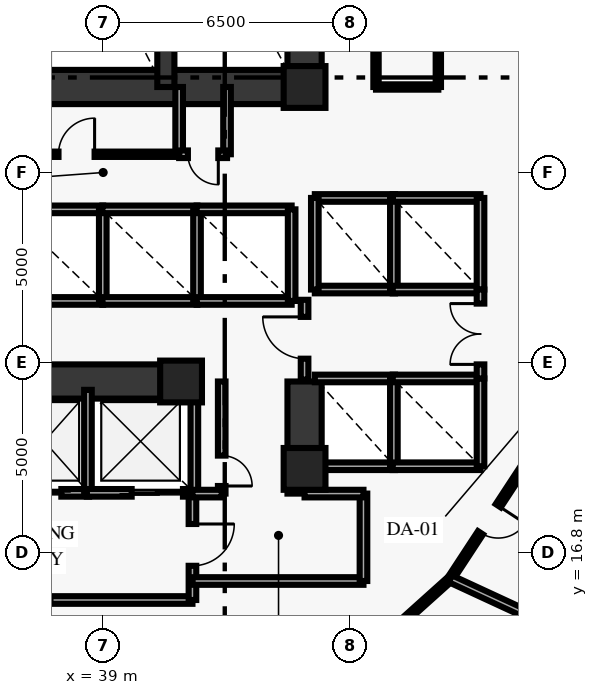
"""IFC4 building model, lengths in metres.
Left out: names, types, materials, properties, quantities, classifications, styles, units other than length and angle.
Written with IfcOpenShell. Run it as: python <this file> out.ifc"""

import sys

from ifc_helpers import new_model, si_unit, direction, frame, frame_2d, origin, origin_2d, place, context, subcontext, project, spatial, rectangle, extrude, element, fill, save


model = new_model("IFC4")
c1 = context("Model", 3, precision=1e-05, world=origin(), true_north=direction((0.0, 1.0)))
c2 = subcontext(c1, "Body", "Model", "MODEL_VIEW")
j1 = project(units=[si_unit("LENGTHUNIT", "METRE"), si_unit("PLANEANGLEUNIT", "RADIAN")], contexts=[c1])
p1 = place(None, origin())
s1 = spatial("IfcSite", under=j1, at=p1, CompositionType="ELEMENT")
p2 = place(p1, origin())
s2 = spatial("IfcBuilding", under=s1, at=p2, CompositionType="ELEMENT")
p3 = place(p2, frame((0.0, 0.0, 16.0)))
s3 = spatial("IfcBuildingStorey", under=s2, at=p3, CompositionType="ELEMENT", Elevation=16.0)
for number, where, z_axis, x_axis in (
    (1, (41.05, 21.3, 0.0), (0.0, 0.0, 1.0), (1.0, 0.0, 0.0)),
    (2, (44.3, 19.0, 0.0), (0.0, 0.0, 1.0), (1.0, 0.0, 0.0)),
    (3, (44.3, 29.05, 0.0), (0.0, 0.0, 1.0), (1.0, 0.0, 0.0)),
):
    element("IfcColumn", number, at=place(p3, frame(where, z_axis=z_axis, x_axis=x_axis)), inside=s3, PredefinedType="PILASTER", context=c2, shape_type="SweptSolid", body=[
        extrude(rectangle(XDim=1.1, YDim=1.1, at=origin_2d()), origin(), (0.0, 0.0, 1.0), 4.74),
    ])
p4 = place(p3, frame((44.3, 29.05, 0.0), z_axis=(0.0, 0.0, 1.0), x_axis=(0.0, 1.0, 0.0)))
e4 = element("IfcWall", 4, at=p4, inside=s3, PredefinedType="SHEAR", context=c2, shape_type="SweptSolid", body=[
    extrude(rectangle(XDim=8.35, YDim=0.9, at=frame_2d((4.175, 0.0))), origin(), (0.0, 0.0, 1.0), 4.74),
])
p5 = place(p3, frame((44.3, 18.35, 0.0), z_axis=(0.0, 0.0, 1.0), x_axis=(0.0, 1.0, 0.0)))
e5 = element("IfcWall", 5, at=p5, inside=s3, PredefinedType="SHEAR", context=c2, shape_type="SweptSolid", body=[
    extrude(rectangle(XDim=2.95, YDim=0.9, at=frame_2d((1.475, 0.0))), origin(), (0.0, 0.0, 1.0), 4.74),
])
p6 = place(p3, frame((33.7, 29.05, 0.0), z_axis=(0.0, 0.0, 1.0), x_axis=(1.0, 0.0, 0.0)))
e6 = element("IfcWall", 6, at=p6, inside=s3, PredefinedType="SHEAR", context=c2, shape_type="SweptSolid", body=[
    extrude(rectangle(XDim=10.6, YDim=0.9, at=frame_2d((5.3, 0.0))), origin(), (0.0, 0.0, 1.0), 4.74),
])
p7 = place(p3, frame((33.7, 21.3, 0.0), z_axis=(0.0, 0.0, 1.0), x_axis=(1.0, 0.0, 0.0)))
e7 = element("IfcWall", 7, at=p7, inside=s3, PredefinedType="SHEAR", context=c2, shape_type="SweptSolid", body=[
    extrude(rectangle(XDim=7.55, YDim=0.9, at=frame_2d((3.775, 0.0))), origin(), (0.0, 0.0, 1.0), 4.74),
])
p8 = place(p3, frame((40.65, 29.05, 0.0), z_axis=(0.0, 0.0, 1.0), x_axis=(0.0, 1.0, 0.0)))
e8 = element("IfcWall", 8, at=p8, inside=s3, PredefinedType="SHEAR", context=c2, shape_type="SweptSolid", body=[
    extrude(rectangle(XDim=8.35, YDim=0.45, at=frame_2d((4.175, 0.0))), origin(), (0.0, 0.0, 1.0), 4.74),
])
for number, where, z_axis, x_axis in (
    (9, (41.0, 27.28, 0.0), (0.0, 0.0, 1.0), (0.0, 1.0, 0.0)),
    (10, (42.26, 27.28, 0.0), (0.0, 0.0, 1.0), (0.0, 1.0, 0.0)),
):
    element("IfcWall", number, at=place(p3, frame(where, z_axis=z_axis, x_axis=x_axis)), inside=s3, PredefinedType="SOLIDWALL", context=c2, shape_type="SweptSolid", body=[
        extrude(rectangle(XDim=1.77, YDim=0.2, at=frame_2d((0.885, 0.0))), origin(), (0.0, 0.0, 1.0), 4.74),
    ])
p9 = place(p3, frame((41.0, 27.28, 0.0), z_axis=(0.0, 0.0, 1.0), x_axis=(1.0, 0.0, 0.0)))
e11 = element("IfcWall", 11, at=p9, inside=s3, PredefinedType="SOLIDWALL", context=c2, shape_type="SweptSolid", body=[
    extrude(rectangle(XDim=1.26, YDim=0.2, at=frame_2d((0.63, 0.0))), origin(), (0.0, 0.0, 1.0), 4.74),
])
p10 = place(p9, frame((0.23, 0.0, 0.0)))
e12 = element("IfcOpeningElement", 12, at=p10, cuts=e11, PredefinedType="OPENING", context=c2, shape_type="SweptSolid", body=[
    extrude(rectangle(XDim=0.8, YDim=2.05, at=frame_2d((0.4, 1.025))), frame((0.0, 0.11, 0.0), z_axis=(0.0, -1.0, 0.0), x_axis=(1.0, 0.0, 0.0)), (0.0, 0.0, 1.0), 0.22),
])
for number, where, z_axis, x_axis in (
    (13, (44.57, 23.72, 0.0), (0.0, 0.0, 1.0), (1.0, 0.0, 0.0)),
    (14, (44.57, 26.13, 0.0), (0.0, 0.0, 1.0), (1.0, 0.0, 0.0)),
):
    element("IfcWall", number, at=place(p3, frame(where, z_axis=z_axis, x_axis=x_axis)), inside=s3, PredefinedType="SOLIDWALL", context=c2, shape_type="SweptSolid", body=[
        extrude(rectangle(XDim=2.11, YDim=0.2, at=frame_2d((1.055, 0.0))), origin(), (0.0, 0.0, 1.0), 4.74),
    ])
for number, where, z_axis, x_axis in (
    (15, (44.57, 23.72, 0.0), (0.0, 0.0, 1.0), (0.0, 1.0, 0.0)),
    (16, (46.65, 23.72, 0.0), (0.0, 0.0, 1.0), (0.0, 1.0, 0.0)),
):
    element("IfcWall", number, at=place(p3, frame(where, z_axis=z_axis, x_axis=x_axis)), inside=s3, PredefinedType="SOLIDWALL", context=c2, shape_type="SweptSolid", body=[
        extrude(rectangle(XDim=2.41, YDim=0.2, at=frame_2d((1.205, 0.0))), origin(), (0.0, 0.0, 1.0), 4.74),
    ])
for number, where, z_axis, x_axis in (
    (17, (46.62, 23.72, 0.0), (0.0, 0.0, 1.0), (1.0, 0.0, 0.0)),
    (18, (46.62, 26.13, 0.0), (0.0, 0.0, 1.0), (1.0, 0.0, 0.0)),
):
    element("IfcWall", number, at=place(p3, frame(where, z_axis=z_axis, x_axis=x_axis)), inside=s3, PredefinedType="SOLIDWALL", context=c2, shape_type="SweptSolid", body=[
        extrude(rectangle(XDim=2.31, YDim=0.2, at=frame_2d((1.155, 0.0))), origin(), (0.0, 0.0, 1.0), 4.74),
    ])
p11 = place(p3, frame((48.93, 23.72, 0.0), z_axis=(0.0, 0.0, 1.0), x_axis=(0.0, 1.0, 0.0)))
e19 = element("IfcWall", 19, at=p11, inside=s3, PredefinedType="SOLIDWALL", context=c2, shape_type="SweptSolid", body=[
    extrude(rectangle(XDim=2.41, YDim=0.2, at=frame_2d((1.205, 0.0))), origin(), (0.0, 0.0, 1.0), 4.74),
])
for number, where, z_axis, x_axis in (
    (20, (44.57, 19.07, 0.0), (0.0, 0.0, 1.0), (1.0, 0.0, 0.0)),
    (21, (44.57, 21.38, 0.0), (0.0, 0.0, 1.0), (1.0, 0.0, 0.0)),
):
    element("IfcWall", number, at=place(p3, frame(where, z_axis=z_axis, x_axis=x_axis)), inside=s3, PredefinedType="SOLIDWALL", context=c2, shape_type="SweptSolid", body=[
        extrude(rectangle(XDim=2.11, YDim=0.2, at=frame_2d((1.055, 0.0))), origin(), (0.0, 0.0, 1.0), 4.74),
    ])
for number, where, z_axis, x_axis in (
    (22, (46.65, 19.07, 0.0), (0.0, 0.0, 1.0), (0.0, 1.0, 0.0)),
    (23, (46.62, 19.07, 0.0), (0.0, 0.0, 1.0), (1.0, 0.0, 0.0)),
    (24, (46.62, 21.38, 0.0), (0.0, 0.0, 1.0), (1.0, 0.0, 0.0)),
    (25, (48.93, 19.07, 0.0), (0.0, 0.0, 1.0), (0.0, 1.0, 0.0)),
):
    element("IfcWall", number, at=place(p3, frame(where, z_axis=z_axis, x_axis=x_axis)), inside=s3, PredefinedType="SOLIDWALL", context=c2, shape_type="SweptSolid", body=[
        extrude(rectangle(XDim=2.31, YDim=0.2, at=frame_2d((1.155, 0.0))), origin(), (0.0, 0.0, 1.0), 4.74),
    ])
for number, where, z_axis, x_axis in (
    (26, (36.5, 23.42, 0.0), (0.0, 0.0, 1.0), (1.0, 0.0, 0.0)),
    (27, (36.5, 25.83, 0.0), (0.0, 0.0, 1.0), (1.0, 0.0, 0.0)),
):
    element("IfcWall", number, at=place(p3, frame(where, z_axis=z_axis, x_axis=x_axis)), inside=s3, PredefinedType="SOLIDWALL", context=c2, shape_type="SweptSolid", body=[
        extrude(rectangle(XDim=2.5, YDim=0.2, at=frame_2d((1.25, 0.0))), origin(), (0.0, 0.0, 1.0), 4.74),
    ])
p12 = place(p3, frame((38.99, 23.42, 0.0), z_axis=(0.0, 0.0, 1.0), x_axis=(0.0, 1.0, 0.0)))
e28 = element("IfcWall", 28, at=p12, inside=s3, PredefinedType="SOLIDWALL", context=c2, shape_type="SweptSolid", body=[
    extrude(rectangle(XDim=2.41, YDim=0.2, at=frame_2d((1.205, 0.0))), origin(), (0.0, 0.0, 1.0), 4.74),
])
for number, where, z_axis, x_axis in (
    (29, (38.98, 23.42, 0.0), (0.0, 0.0, 1.0), (1.0, 0.0, 0.0)),
    (30, (38.98, 25.83, 0.0), (0.0, 0.0, 1.0), (1.0, 0.0, 0.0)),
):
    element("IfcWall", number, at=place(p3, frame(where, z_axis=z_axis, x_axis=x_axis)), inside=s3, PredefinedType="SOLIDWALL", context=c2, shape_type="SweptSolid", body=[
        extrude(rectangle(XDim=2.5, YDim=0.2, at=frame_2d((1.25, 0.0))), origin(), (0.0, 0.0, 1.0), 4.74),
    ])
p13 = place(p3, frame((41.47, 23.42, 0.0), z_axis=(0.0, 0.0, 1.0), x_axis=(0.0, 1.0, 0.0)))
e31 = element("IfcWall", 31, at=p13, inside=s3, PredefinedType="SOLIDWALL", context=c2, shape_type="SweptSolid", body=[
    extrude(rectangle(XDim=2.41, YDim=0.2, at=frame_2d((1.205, 0.0))), origin(), (0.0, 0.0, 1.0), 4.74),
])
for number, where, z_axis, x_axis in (
    (32, (41.46, 23.42, 0.0), (0.0, 0.0, 1.0), (1.0, 0.0, 0.0)),
    (33, (41.46, 25.83, 0.0), (0.0, 0.0, 1.0), (1.0, 0.0, 0.0)),
):
    element("IfcWall", number, at=place(p3, frame(where, z_axis=z_axis, x_axis=x_axis)), inside=s3, PredefinedType="SOLIDWALL", context=c2, shape_type="SweptSolid", body=[
        extrude(rectangle(XDim=2.5, YDim=0.2, at=frame_2d((1.25, 0.0))), origin(), (0.0, 0.0, 1.0), 4.74),
    ])
p14 = place(p3, frame((43.96, 23.42, 0.0), z_axis=(0.0, 0.0, 1.0), x_axis=(0.0, 1.0, 0.0)))
e34 = element("IfcWall", 34, at=p14, inside=s3, PredefinedType="SOLIDWALL", context=c2, shape_type="SweptSolid", body=[
    extrude(rectangle(XDim=2.41, YDim=0.2, at=frame_2d((1.205, 0.0))), origin(), (0.0, 0.0, 1.0), 4.74),
])
p15 = place(p3, frame((36.27, 18.37, 0.0), z_axis=(0.0, 0.0, 1.0), x_axis=(1.0, 0.0, 0.0)))
e35 = element("IfcWall", 35, at=p15, inside=s3, PredefinedType="SOLIDWALL", context=c2, shape_type="SweptSolid", body=[
    extrude(rectangle(XDim=2.36, YDim=0.2, at=frame_2d((1.18, 0.0))), origin(), (0.0, 0.0, 1.0), 4.74),
])
p16 = place(p15, frame((0.38, 0.0, 0.0)))
e36 = element("IfcOpeningElement", 36, at=p16, cuts=e35, PredefinedType="OPENING", context=c2, shape_type="SweptSolid", body=[
    extrude(rectangle(XDim=1.25, YDim=2.2, at=frame_2d((0.625, 1.1))), frame((0.0, 0.11, 0.0), z_axis=(0.0, -1.0, 0.0), x_axis=(1.0, 0.0, 0.0)), (0.0, 0.0, 1.0), 0.22),
])
p17 = place(p3, frame((38.6, 18.37, 0.0), z_axis=(0.0, 0.0, 1.0), x_axis=(0.0, 1.0, 0.0)))
e37 = element("IfcWall", 37, at=p17, inside=s3, PredefinedType="SOLIDWALL", context=c2, shape_type="SweptSolid", body=[
    extrude(rectangle(XDim=2.71, YDim=0.2, at=frame_2d((1.355, 0.0))), origin(), (0.0, 0.0, 1.0), 4.74),
])
p18 = place(p3, frame((38.57, 18.37, 0.0), z_axis=(0.0, 0.0, 1.0), x_axis=(1.0, 0.0, 0.0)))
e38 = element("IfcWall", 38, at=p18, inside=s3, PredefinedType="SOLIDWALL", context=c2, shape_type="SweptSolid", body=[
    extrude(rectangle(XDim=2.83, YDim=0.2, at=frame_2d((1.415, 0.0))), origin(), (0.0, 0.0, 1.0), 4.74),
])
p19 = place(p18, frame((1.18, 0.0, 0.0)))
e39 = element("IfcOpeningElement", 39, at=p19, cuts=e38, PredefinedType="OPENING", context=c2, shape_type="SweptSolid", body=[
    extrude(rectangle(XDim=1.35, YDim=2.18, at=frame_2d((0.675, 1.09))), frame((0.0, 0.11, 0.0), z_axis=(0.0, -1.0, 0.0), x_axis=(1.0, 0.0, 0.0)), (0.0, 0.0, 1.0), 0.22),
])
p20 = place(p3, frame((41.4, 18.37, 0.0), z_axis=(0.0, 0.0, 1.0), x_axis=(0.0, 1.0, 0.0)))
e40 = element("IfcWall", 40, at=p20, inside=s3, PredefinedType="SOLIDWALL", context=c2, shape_type="SweptSolid", body=[
    extrude(rectangle(XDim=2.71, YDim=0.2, at=frame_2d((1.355, 0.0))), origin(), (0.0, 0.0, 1.0), 4.74),
])
p21 = place(p3, frame((48.93, 21.38, 0.0), z_axis=(0.0, 0.0, 1.0), x_axis=(0.0, 1.0, 0.0)))
e41 = element("IfcWall", 41, at=p21, inside=s3, PredefinedType="SOLIDWALL", context=c2, shape_type="SweptSolid", body=[
    extrude(rectangle(XDim=2.34, YDim=0.2, at=frame_2d((1.17, 0.0))), origin(), (0.0, 0.0, 1.0), 4.74),
])
p22 = place(p21, frame((0.37, 0.0, 0.0)))
e42 = element("IfcOpeningElement", 42, at=p22, cuts=e41, PredefinedType="OPENING", context=c2, shape_type="SweptSolid", body=[
    extrude(rectangle(XDim=1.6, YDim=2.2, at=frame_2d((0.8, 1.1))), frame((0.0, 0.11, 0.0), z_axis=(0.0, -1.0, 0.0), x_axis=(1.0, 0.0, 0.0)), (0.0, 0.0, 1.0), 0.22),
])
p23 = place(p3, frame((44.3, 21.35, 0.0), z_axis=(0.0, 0.0, 1.0), x_axis=(0.0, 1.0, 0.0)))
e43 = element("IfcWall", 43, at=p23, inside=s3, PredefinedType="SOLIDWALL", context=c2, shape_type="SweptSolid", body=[
    extrude(rectangle(XDim=2.1, YDim=0.2, at=frame_2d((1.05, 0.0))), origin(), (0.0, 0.0, 1.0), 3.96),
])
p24 = place(p23, frame((0.55, 0.0, 0.0)))
e44 = element("IfcOpeningElement", 44, at=p24, cuts=e43, PredefinedType="OPENING", context=c2, shape_type="SweptSolid", body=[
    extrude(rectangle(XDim=1.1, YDim=2.15, at=frame_2d((0.55, 1.075))), frame((0.0, 0.11, 0.0), z_axis=(0.0, -1.0, 0.0), x_axis=(1.0, 0.0, 0.0)), (0.0, 0.0, 1.0), 0.22),
])
p25 = place(p3, frame((33.8, 15.55, 0.0), z_axis=(0.0, 0.0, 1.0), x_axis=(1.0, 0.0, 0.0)))
e45 = element("IfcWall", 45, at=p25, inside=s3, PredefinedType="SOLIDWALL", context=c2, shape_type="SweptSolid", body=[
    extrude(rectangle(XDim=7.55, YDim=0.2, at=frame_2d((3.775, 0.0))), origin(), (0.0, 0.0, 1.0), 4.74),
])
p26 = place(p3, frame((41.35, 15.55, 0.0), z_axis=(0.0, 0.0, 1.0), x_axis=(0.0, 1.0, 0.0)))
e46 = element("IfcWall", 46, at=p26, inside=s3, PredefinedType="SOLIDWALL", context=c2, shape_type="SweptSolid", body=[
    extrude(rectangle(XDim=2.8, YDim=0.2, at=frame_2d((1.4, 0.0))), origin(), (0.0, 0.0, 1.0), 4.74),
])
p27 = place(p26, frame((0.9, 0.0, 0.0)))
e47 = element("IfcOpeningElement", 47, at=p27, cuts=e46, PredefinedType="OPENING", context=c2, shape_type="SweptSolid", body=[
    extrude(rectangle(XDim=1.1, YDim=2.15, at=frame_2d((0.55, 1.075))), frame((0.0, 0.11, 0.0), z_axis=(0.0, -1.0, 0.0), x_axis=(1.0, 0.0, 0.0)), (0.0, 0.0, 1.0), 0.22),
])
p28 = place(p3, frame((41.35, 16.05, 0.0), z_axis=(0.0, 0.0, 1.0), x_axis=(1.0, 0.0, 0.0)))
e48 = element("IfcWall", 48, at=p28, inside=s3, PredefinedType="SOLIDWALL", context=c2, shape_type="SweptSolid", body=[
    extrude(rectangle(XDim=4.5, YDim=0.2, at=frame_2d((2.25, 0.0))), origin(), (0.0, 0.0, 1.0), 4.74),
])
p29 = place(p3, frame((45.85, 16.05, 0.0), z_axis=(0.0, 0.0, 1.0), x_axis=(0.0, 1.0, 0.0)))
e49 = element("IfcWall", 49, at=p29, inside=s3, PredefinedType="SOLIDWALL", context=c2, shape_type="SweptSolid", body=[
    extrude(rectangle(XDim=2.3, YDim=0.2, at=frame_2d((1.15, 0.0))), origin(), (0.0, 0.0, 1.0), 4.74),
])
p30 = place(p3, frame((44.3, 18.35, 0.0), z_axis=(0.0, 0.0, 1.0), x_axis=(1.0, 0.0, 0.0)))
e50 = element("IfcWall", 50, at=p30, inside=s3, PredefinedType="SOLIDWALL", context=c2, shape_type="SweptSolid", body=[
    extrude(rectangle(XDim=1.55, YDim=0.2, at=frame_2d((0.775, 0.0))), origin(), (0.0, 0.0, 1.0), 4.74),
])
p31 = place(p3, frame((42.12, 18.35, 0.0), z_axis=(0.0, 0.0, 1.0), x_axis=(0.0, 1.0, 0.0)))
e51 = element("IfcWall", 51, at=p31, inside=s3, PredefinedType="SOLIDWALL", context=c2, shape_type="SweptSolid", body=[
    extrude(rectangle(XDim=2.95, YDim=0.2, at=frame_2d((1.475, 0.0))), origin(), (0.0, 0.0, 1.0), 4.74),
])
p32 = place(p31, frame((0.2, 0.0, 0.0)))
e52 = element("IfcOpeningElement", 52, at=p32, cuts=e51, PredefinedType="OPENING", context=c2, shape_type="SweptSolid", body=[
    extrude(rectangle(XDim=0.8, YDim=2.05, at=frame_2d((0.4, 1.025))), frame((0.0, 0.11, 0.0), z_axis=(0.0, -1.0, 0.0), x_axis=(1.0, 0.0, 0.0)), (0.0, 0.0, 1.0), 0.22),
])
p33 = place(p3, frame((41.35, 18.35, 0.0), z_axis=(0.0, 0.0, 1.0), x_axis=(1.0, 0.0, 0.0)))
e53 = element("IfcWall", 53, at=p33, inside=s3, PredefinedType="SOLIDWALL", context=c2, shape_type="SweptSolid", body=[
    extrude(rectangle(XDim=0.77, YDim=0.2, at=frame_2d((0.385, 0.0))), origin(), (0.0, 0.0, 1.0), 4.74),
])
p34 = place(p3, frame((35.6, 27.28, 0.0), z_axis=(0.0, 0.0, 1.0), x_axis=(1.0, 0.0, 0.0)))
e54 = element("IfcWall", 54, at=p34, inside=s3, PredefinedType="PARTITIONING", context=c2, shape_type="SweptSolid", body=[
    extrude(rectangle(XDim=5.4, YDim=0.14, at=frame_2d((2.7, 0.0))), origin(), (0.0, 0.0, 1.0), 4.74),
])
p35 = place(p34, frame((2.225, 0.0, 0.0)))
e55 = element("IfcOpeningElement", 55, at=p35, cuts=e54, PredefinedType="OPENING", context=c2, shape_type="SweptSolid", body=[
    extrude(rectangle(XDim=0.95, YDim=2.1, at=frame_2d((0.475, 1.05))), frame((0.0, 0.08, 0.0), z_axis=(0.0, -1.0, 0.0), x_axis=(1.0, 0.0, 0.0)), (0.0, 0.0, 1.0), 0.16),
])
p36 = place(p3, frame((46.18, 34.05, 0.0), z_axis=(0.0, 0.0, 1.0), x_axis=(0.0, -1.0, 0.0)))
e56 = element("IfcWall", 56, at=p36, inside=s3, PredefinedType="PARTITIONING", context=c2, shape_type="SweptSolid", body=[
    extrude(rectangle(XDim=5.0, YDim=0.14, at=frame_2d((2.5, 0.0))), origin(), (0.0, 0.0, 1.0), 4.74),
])
p37 = place(p36, frame((2.1, 0.0, 0.0)))
e57 = element("IfcOpeningElement", 57, at=p37, cuts=e56, PredefinedType="OPENING", context=c2, shape_type="SweptSolid", body=[
    extrude(rectangle(XDim=0.8, YDim=2.05, at=frame_2d((0.4, 1.025))), frame((0.0, 0.08, 0.0), z_axis=(0.0, -1.0, 0.0), x_axis=(1.0, 0.0, 0.0)), (0.0, 0.0, 1.0), 0.16),
])
p38 = place(p3, frame((46.18, 29.05, 0.0), z_axis=(0.0, 0.0, 1.0), x_axis=(1.0, 0.0, 0.0)))
e58 = element("IfcWall", 58, at=p38, inside=s3, PredefinedType="PARTITIONING", context=c2, shape_type="SweptSolid", body=[
    extrude(rectangle(XDim=1.64, YDim=0.14, at=frame_2d((0.82, 0.0))), origin(), (0.0, 0.0, 1.0), 2.74),
])
p39 = place(p3, frame((47.82, 29.05, 0.0), z_axis=(0.0, 0.0, 1.0), x_axis=(0.0, 1.0, 0.0)))
e59 = element("IfcWall", 59, at=p39, inside=s3, PredefinedType="PARTITIONING", context=c2, shape_type="SweptSolid", body=[
    extrude(rectangle(XDim=5.0, YDim=0.14, at=frame_2d((2.5, 0.0))), origin(), (0.0, 0.0, 1.0), 4.74),
])
p40 = place(p3, frame((45.46, 13.706, 0.0), z_axis=(0.0, 0.0, 1.0), x_axis=(0.744066617248, 0.668105432621, 0.0)))
e60 = element("IfcWall", 60, at=p40, inside=s3, PredefinedType="PARTITIONING", context=c2, shape_type="SweptSolid", body=[
    extrude(rectangle(XDim=3.596, YDim=0.16, at=frame_2d((1.798, 0.0))), origin(), (0.0, 0.0, 1.0), 4.74),
])
p41 = place(p3, frame((50.189, 19.24, 0.0), z_axis=(0.0, 0.0, 1.0), x_axis=(-0.548318837904, -0.836269365694, 0.0)))
e61 = element("IfcWall", 61, at=p41, inside=s3, PredefinedType="PARTITIONING", context=c2, shape_type="SweptSolid", body=[
    extrude(rectangle(XDim=3.744, YDim=0.16, at=frame_2d((1.872, 0.0))), origin(), (0.0, 0.0, 1.0), 4.74),
])
p42 = place(p41, frame((1.447, 0.0, 0.0)))
e62 = element("IfcOpeningElement", 62, at=p42, cuts=e61, PredefinedType="OPENING", context=c2, shape_type="SweptSolid", body=[
    extrude(rectangle(XDim=0.85, YDim=2.1, at=frame_2d((0.425, 1.05))), frame((0.0, 0.09, 0.0), z_axis=(0.0, -1.0, 0.0), x_axis=(1.0, 0.0, 0.0)), (0.0, 0.0, 1.0), 0.18),
])
p43 = place(p3, frame((48.136, 16.109, 0.0), z_axis=(0.0, 0.0, 1.0), x_axis=(0.907508335547, -0.420034071133, 0.0)))
e63 = element("IfcWall", 63, at=p43, inside=s3, PredefinedType="PARTITIONING", context=c2, shape_type="SweptSolid", body=[
    extrude(rectangle(XDim=2.538, YDim=0.2, at=frame_2d((1.269, 0.0))), origin(), (0.0, 0.0, 1.0), 4.74),
])
p44 = place(p10, origin())
e64 = element("IfcDoor", 64, at=p44, inside=s3, OperationType="SINGLE_SWING_RIGHT", PredefinedType="DOOR", context=c2, shape_type="SweptSolid", body=[
    extrude(rectangle(XDim=0.8, YDim=2.05, at=frame_2d((0.4, 1.025))), frame((0.0, 0.025, 0.0), z_axis=(0.0, -1.0, 0.0), x_axis=(1.0, 0.0, 0.0)), (0.0, 0.0, 1.0), 0.05),
])
fill(e12, e64)
p45 = place(p16, origin())
e65 = element("IfcDoor", 65, at=p45, inside=s3, OperationType="DOUBLE_DOOR_SLIDING", PredefinedType="DOOR", context=c2, shape_type="SweptSolid", body=[
    extrude(rectangle(XDim=1.25, YDim=2.2, at=frame_2d((0.625, 1.1))), frame((0.0, 0.025, 0.0), z_axis=(0.0, -1.0, 0.0), x_axis=(1.0, 0.0, 0.0)), (0.0, 0.0, 1.0), 0.05),
])
fill(e36, e65)
p46 = place(p19, origin())
e66 = element("IfcDoor", 66, at=p46, inside=s3, OperationType="DOUBLE_DOOR_SLIDING", PredefinedType="DOOR", context=c2, shape_type="SweptSolid", body=[
    extrude(rectangle(XDim=1.35, YDim=2.18, at=frame_2d((0.675, 1.09))), frame((0.0, 0.025, 0.0), z_axis=(0.0, -1.0, 0.0), x_axis=(1.0, 0.0, 0.0)), (0.0, 0.0, 1.0), 0.05),
])
fill(e39, e66)
p47 = place(p22, origin())
e67 = element("IfcDoor", 67, at=p47, inside=s3, OperationType="DOUBLE_DOOR_SINGLE_SWING", PredefinedType="DOOR", context=c2, shape_type="SweptSolid", body=[
    extrude(rectangle(XDim=1.6, YDim=2.2, at=frame_2d((0.8, 1.1))), frame((0.0, 0.025, 0.0), z_axis=(0.0, -1.0, 0.0), x_axis=(1.0, 0.0, 0.0)), (0.0, 0.0, 1.0), 0.05),
])
fill(e42, e67)
p48 = place(p24, origin())
e68 = element("IfcDoor", 68, at=p48, inside=s3, OperationType="SINGLE_SWING_RIGHT", PredefinedType="DOOR", context=c2, shape_type="SweptSolid", body=[
    extrude(rectangle(XDim=1.1, YDim=2.15, at=frame_2d((0.55, 1.075))), frame((0.0, 0.025, 0.0), z_axis=(0.0, -1.0, 0.0), x_axis=(1.0, 0.0, 0.0)), (0.0, 0.0, 1.0), 0.05),
])
fill(e44, e68)
p49 = place(p27, origin())
e69 = element("IfcDoor", 69, at=p49, inside=s3, OperationType="SINGLE_SWING_RIGHT", PredefinedType="DOOR", context=c2, shape_type="SweptSolid", body=[
    extrude(rectangle(XDim=1.1, YDim=2.15, at=frame_2d((0.55, 1.075))), frame((0.0, 0.025, 0.0), z_axis=(0.0, -1.0, 0.0), x_axis=(1.0, 0.0, 0.0)), (0.0, 0.0, 1.0), 0.05),
])
fill(e47, e69)
p50 = place(p32, origin())
e70 = element("IfcDoor", 70, at=p50, inside=s3, OperationType="SINGLE_SWING_LEFT", PredefinedType="DOOR", context=c2, shape_type="SweptSolid", body=[
    extrude(rectangle(XDim=0.8, YDim=2.05, at=frame_2d((0.4, 1.025))), frame((0.0, 0.025, 0.0), z_axis=(0.0, -1.0, 0.0), x_axis=(1.0, 0.0, 0.0)), (0.0, 0.0, 1.0), 0.05),
])
fill(e52, e70)
p51 = place(p35, origin())
e71 = element("IfcDoor", 71, at=p51, inside=s3, OperationType="SINGLE_SWING_RIGHT", PredefinedType="DOOR", context=c2, shape_type="SweptSolid", body=[
    extrude(rectangle(XDim=0.95, YDim=2.1, at=frame_2d((0.475, 1.05))), frame((0.0, 0.025, 0.0), z_axis=(0.0, -1.0, 0.0), x_axis=(1.0, 0.0, 0.0)), (0.0, 0.0, 1.0), 0.05),
])
fill(e55, e71)
p52 = place(p42, origin())
e72 = element("IfcDoor", 72, at=p52, inside=s3, OperationType="SINGLE_SWING_LEFT", PredefinedType="DOOR", context=c2, shape_type="SweptSolid", body=[
    extrude(rectangle(XDim=0.85, YDim=2.1, at=frame_2d((0.425, 1.05))), frame((0.0, 0.025, 0.0), z_axis=(0.0, -1.0, 0.0), x_axis=(1.0, 0.0, 0.0)), (0.0, 0.0, 1.0), 0.05),
])
fill(e62, e72)
save(model, sys.argv[1])
